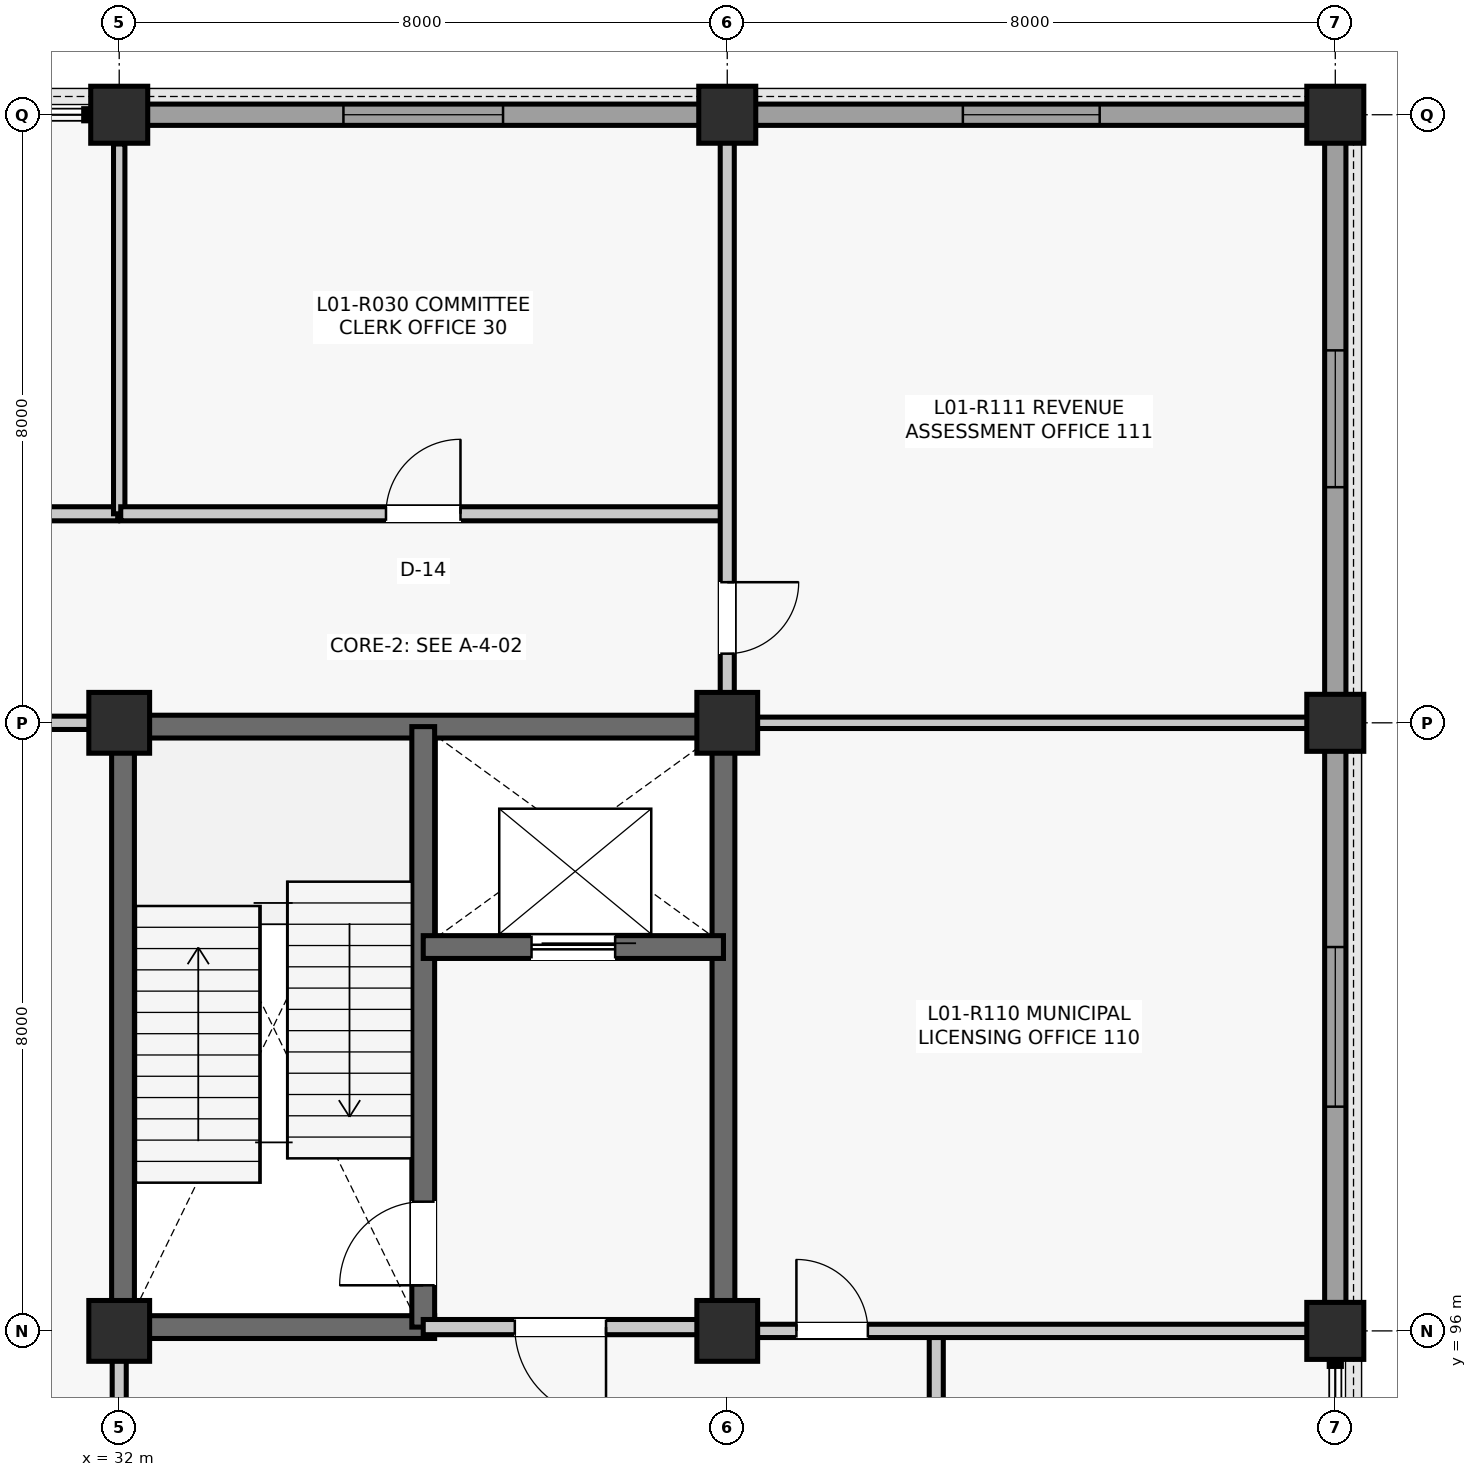
"""IFC4 building model, lengths in metres.
Left out: names, types, materials, properties, quantities, classifications, styles, units other than length and angle.
Written with IfcOpenShell. Run it as: python <this file> out.ifc"""

import sys

from ifc_helpers import new_model, si_unit, direction, frame, frame_2d, origin, origin_2d, place, context, subcontext, project, spatial, rectangle, extrude, element, fill, save


model = new_model("IFC4")
c1 = context("Model", 3, precision=1e-05, world=origin(), true_north=direction((0.0, 1.0)))
c2 = subcontext(c1, "Body", "Model", "MODEL_VIEW")
j1 = project(units=[si_unit("LENGTHUNIT", "METRE"), si_unit("PLANEANGLEUNIT", "RADIAN")], contexts=[c1])
p1 = place(None, origin())
s1 = spatial("IfcSite", under=j1, at=p1, CompositionType="ELEMENT")
p2 = place(p1, origin())
s2 = spatial("IfcBuilding", under=s1, at=p2, CompositionType="ELEMENT")
p3 = place(p2, frame((0.0, 0.0, 5.28)))
s3 = spatial("IfcBuildingStorey", under=s2, at=p3, CompositionType="ELEMENT", Elevation=5.28)
for number, where, z_axis, x_axis in (
    (1, (32.0, 96.0, 0.0), (0.0, 0.0, 1.0), (1.0, 0.0, 0.0)),
    (2, (32.0, 104.0, 0.0), (0.0, 0.0, 1.0), (1.0, 0.0, 0.0)),
):
    element("IfcColumn", number, at=place(p3, frame(where, z_axis=z_axis, x_axis=x_axis)), inside=s3, PredefinedType="COLUMN", context=c2, shape_type="SweptSolid", body=[
        extrude(rectangle(XDim=0.8, YDim=0.8, at=origin_2d()), origin(), (0.0, 0.0, 1.0), 4.62),
    ])
p4 = place(p3, frame((32.0, 112.0, 0.0), z_axis=(0.0, 0.0, 1.0), x_axis=(1.0, 0.0, 0.0)))
e3 = element("IfcColumn", 3, at=p4, inside=s3, PredefinedType="COLUMN", context=c2, shape_type="SweptSolid", body=[
    extrude(rectangle(XDim=0.75, YDim=0.75, at=origin_2d()), origin(), (0.0, 0.0, 1.0), 4.62),
])
for number, where, z_axis, x_axis in (
    (4, (40.0, 96.0, 0.0), (0.0, 0.0, 1.0), (1.0, 0.0, 0.0)),
    (5, (40.0, 104.0, 0.0), (0.0, 0.0, 1.0), (1.0, 0.0, 0.0)),
):
    element("IfcColumn", number, at=place(p3, frame(where, z_axis=z_axis, x_axis=x_axis)), inside=s3, PredefinedType="COLUMN", context=c2, shape_type="SweptSolid", body=[
        extrude(rectangle(XDim=0.8, YDim=0.8, at=origin_2d()), origin(), (0.0, 0.0, 1.0), 4.62),
    ])
for number, where, z_axis, x_axis in (
    (6, (40.0, 112.0, 0.0), (0.0, 0.0, 1.0), (1.0, 0.0, 0.0)),
    (7, (48.0, 96.0, 0.0), (0.0, 0.0, 1.0), (1.0, 0.0, 0.0)),
    (8, (48.0, 104.0, 0.0), (0.0, 0.0, 1.0), (1.0, 0.0, 0.0)),
    (9, (48.0, 112.0, 0.0), (0.0, 0.0, 1.0), (1.0, 0.0, 0.0)),
):
    element("IfcColumn", number, at=place(p3, frame(where, z_axis=z_axis, x_axis=x_axis)), inside=s3, PredefinedType="COLUMN", context=c2, shape_type="SweptSolid", body=[
        extrude(rectangle(XDim=0.75, YDim=0.75, at=origin_2d()), origin(), (0.0, 0.0, 1.0), 4.62),
    ])
p5 = place(p3, frame((32.36, 112.0, 0.0), z_axis=(0.0, 0.0, 1.0), x_axis=(1.0, 0.0, 0.0)))
e10 = element("IfcWall", 10, at=p5, inside=s3, PredefinedType="SOLIDWALL", context=c2, shape_type="SweptSolid", body=[
    extrude(rectangle(XDim=7.28, YDim=0.28, at=frame_2d((3.64, 0.0))), origin(), (0.0, 0.0, 1.0), 4.022),
])
p6 = place(p5, frame((2.59, 0.0, 0.9)))
e11 = element("IfcOpeningElement", 11, at=p6, cuts=e10, PredefinedType="OPENING", context=c2, shape_type="SweptSolid", body=[
    extrude(rectangle(XDim=2.1, YDim=2.4, at=frame_2d((1.05, 1.2))), frame((0.0, 0.15, 0.0), z_axis=(0.0, -1.0, 0.0), x_axis=(1.0, 0.0, 0.0)), (0.0, 0.0, 1.0), 0.3),
])
p7 = place(p3, frame((48.0, 96.36, 0.0), z_axis=(0.0, 0.0, 1.0), x_axis=(0.0, 1.0, 0.0)))
e12 = element("IfcWall", 12, at=p7, inside=s3, PredefinedType="SOLIDWALL", context=c2, shape_type="SweptSolid", body=[
    extrude(rectangle(XDim=7.28, YDim=0.28, at=frame_2d((3.64, 0.0))), origin(), (0.0, 0.0, 1.0), 3.977),
])
p8 = place(p7, frame((2.59, 0.0, 0.9)))
e13 = element("IfcOpeningElement", 13, at=p8, cuts=e12, PredefinedType="OPENING", context=c2, shape_type="SweptSolid", body=[
    extrude(rectangle(XDim=2.1, YDim=2.4, at=frame_2d((1.05, 1.2))), frame((0.0, 0.15, 0.0), z_axis=(0.0, -1.0, 0.0), x_axis=(1.0, 0.0, 0.0)), (0.0, 0.0, 1.0), 0.3),
])
p9 = place(p3, frame((40.36, 112.0, 0.0), z_axis=(0.0, 0.0, 1.0), x_axis=(1.0, 0.0, 0.0)))
e14 = element("IfcWall", 14, at=p9, inside=s3, PredefinedType="SOLIDWALL", context=c2, shape_type="SweptSolid", body=[
    extrude(rectangle(XDim=7.28, YDim=0.28, at=frame_2d((3.64, 0.0))), origin(), (0.0, 0.0, 1.0), 3.91),
])
p10 = place(p9, frame((2.74, 0.0, 0.9)))
e15 = element("IfcOpeningElement", 15, at=p10, cuts=e14, PredefinedType="OPENING", context=c2, shape_type="SweptSolid", body=[
    extrude(rectangle(XDim=1.8, YDim=2.3, at=frame_2d((0.9, 1.15))), frame((0.0, 0.15, 0.0), z_axis=(0.0, -1.0, 0.0), x_axis=(1.0, 0.0, 0.0)), (0.0, 0.0, 1.0), 0.3),
])
p11 = place(p3, frame((48.0, 104.36, 0.0), z_axis=(0.0, 0.0, 1.0), x_axis=(0.0, 1.0, 0.0)))
e16 = element("IfcWall", 16, at=p11, inside=s3, PredefinedType="SOLIDWALL", context=c2, shape_type="SweptSolid", body=[
    extrude(rectangle(XDim=7.28, YDim=0.28, at=frame_2d((3.64, 0.0))), origin(), (0.0, 0.0, 1.0), 3.91),
])
p12 = place(p11, frame((2.74, 0.0, 0.9)))
e17 = element("IfcOpeningElement", 17, at=p12, cuts=e16, PredefinedType="OPENING", context=c2, shape_type="SweptSolid", body=[
    extrude(rectangle(XDim=1.8, YDim=2.3, at=frame_2d((0.9, 1.15))), frame((0.0, 0.15, 0.0), z_axis=(0.0, -1.0, 0.0), x_axis=(1.0, 0.0, 0.0)), (0.0, 0.0, 1.0), 0.3),
])
for number, where, z_axis, x_axis in (
    (18, (32.05, 96.29, 0.0), (0.0, 0.0, 1.0), (0.0, 1.0, 0.0)),
    (19, (32.29, 103.95, 0.0), (0.0, 0.0, 1.0), (1.0, 0.0, 0.0)),
    (20, (39.95, 96.29, 0.0), (0.0, 0.0, 1.0), (0.0, 1.0, 0.0)),
):
    element("IfcWall", number, at=place(p3, frame(where, z_axis=z_axis, x_axis=x_axis)), inside=s3, PredefinedType="SHEAR", context=c2, shape_type="SweptSolid", body=[
        extrude(rectangle(XDim=7.42, YDim=0.3, at=frame_2d((3.71, 0.0))), origin(), (0.0, 0.0, 1.0), 4.335),
    ])
p13 = place(p3, frame((32.29, 96.05, 0.0), z_axis=(0.0, 0.0, 1.0), x_axis=(1.0, 0.0, 0.0)))
e21 = element("IfcWall", 21, at=p13, inside=s3, PredefinedType="SHEAR", context=c2, shape_type="SweptSolid", body=[
    extrude(rectangle(XDim=3.86, YDim=0.3, at=frame_2d((1.93, 0.0))), origin(), (0.0, 0.0, 1.0), 4.335),
])
p14 = place(p3, frame((36.0, 96.05, 0.0), z_axis=(0.0, 0.0, 1.0), x_axis=(0.0, 1.0, 0.0)))
e22 = element("IfcWall", 22, at=p14, inside=s3, PredefinedType="SHEAR", context=c2, shape_type="SweptSolid", body=[
    extrude(rectangle(XDim=7.9, YDim=0.3, at=frame_2d((3.95, 0.0))), origin(), (0.0, 0.0, 1.0), 4.335),
])
p15 = place(p14, frame((0.55, 0.0, 0.0)))
e23 = element("IfcOpeningElement", 23, at=p15, cuts=e22, PredefinedType="OPENING", context=c2, shape_type="SweptSolid", body=[
    extrude(rectangle(XDim=1.1, YDim=2.15, at=frame_2d((0.55, 1.075))), frame((0.0, 0.16, 0.0), z_axis=(0.0, -1.0, 0.0), x_axis=(1.0, 0.0, 0.0)), (0.0, 0.0, 1.0), 0.32),
])
p16 = place(p3, frame((36.0, 101.05, 0.0), z_axis=(0.0, 0.0, 1.0), x_axis=(1.0, 0.0, 0.0)))
e24 = element("IfcWall", 24, at=p16, inside=s3, PredefinedType="SHEAR", context=c2, shape_type="SweptSolid", body=[
    extrude(rectangle(XDim=3.95, YDim=0.3, at=frame_2d((1.975, 0.0))), origin(), (0.0, 0.0, 1.0), 4.335),
])
p17 = place(p16, frame((1.425, 0.0, 0.0)))
e25 = element("IfcOpeningElement", 25, at=p17, cuts=e24, PredefinedType="OPENING", context=c2, shape_type="SweptSolid", body=[
    extrude(rectangle(XDim=1.1, YDim=2.2, at=frame_2d((0.55, 1.1))), frame((0.0, 0.16, 0.0), z_axis=(0.0, -1.0, 0.0), x_axis=(1.0, 0.0, 0.0)), (0.0, 0.0, 1.0), 0.32),
])
p18 = place(p3, frame((36.0, 96.05, 0.0), z_axis=(0.0, 0.0, 1.0), x_axis=(1.0, 0.0, 0.0)))
e26 = element("IfcWall", 26, at=p18, inside=s3, PredefinedType="PARTITIONING", context=c2, shape_type="SweptSolid", body=[
    extrude(rectangle(XDim=3.61, YDim=0.2, at=frame_2d((1.805, 0.0))), origin(), (0.0, 0.0, 1.0), 3.712),
])
p19 = place(p18, frame((1.205, 0.0, 0.0)))
e27 = element("IfcOpeningElement", 27, at=p19, cuts=e26, PredefinedType="OPENING", context=c2, shape_type="SweptSolid", body=[
    extrude(rectangle(XDim=1.2, YDim=2.15, at=frame_2d((0.6, 1.075))), frame((0.0, 0.11, 0.0), z_axis=(0.0, -1.0, 0.0), x_axis=(1.0, 0.0, 0.0)), (0.0, 0.0, 1.0), 0.22),
])
p20 = place(p3, frame((24.02, 106.75, 0.0), z_axis=(0.0, 0.0, 1.0), x_axis=(1.0, 0.0, 0.0)))
e28 = element("IfcWall", 28, at=p20, inside=s3, PredefinedType="PARTITIONING", context=c2, shape_type="SweptSolid", body=[
    extrude(rectangle(XDim=7.96, YDim=0.185, at=frame_2d((3.98, 0.0))), origin(), (0.0, 0.0, 1.0), 3.787),
])
p21 = place(p20, frame((3.5, 0.0, 0.0)))
e29 = element("IfcOpeningElement", 29, at=p21, cuts=e28, PredefinedType="OPENING", context=c2, shape_type="SweptSolid", body=[
    extrude(rectangle(XDim=0.96, YDim=2.14, at=frame_2d((0.48, 1.07))), frame((0.0, 0.103, 0.0), z_axis=(0.0, -1.0, 0.0), x_axis=(1.0, 0.0, 0.0)), (0.0, 0.0, 1.0), 0.205),
])
p22 = place(p3, frame((32.0, 106.75, 0.0), z_axis=(0.0, 0.0, 1.0), x_axis=(0.0, 1.0, 0.0)))
e30 = element("IfcWall", 30, at=p22, inside=s3, PredefinedType="PARTITIONING", context=c2, shape_type="SweptSolid", body=[
    extrude(rectangle(XDim=4.865, YDim=0.15, at=frame_2d((2.433, 0.0))), origin(), (0.0, 0.0, 1.0), 3.902),
])
p23 = place(p3, frame((32.02, 106.75, 0.0), z_axis=(0.0, 0.0, 1.0), x_axis=(1.0, 0.0, 0.0)))
e31 = element("IfcWall", 31, at=p23, inside=s3, PredefinedType="PARTITIONING", context=c2, shape_type="SweptSolid", body=[
    extrude(rectangle(XDim=7.96, YDim=0.185, at=frame_2d((3.98, 0.0))), origin(), (0.0, 0.0, 1.0), 3.781),
])
p24 = place(p23, frame((3.49, 0.0, 0.0)))
e32 = element("IfcOpeningElement", 32, at=p24, cuts=e31, PredefinedType="OPENING", context=c2, shape_type="SweptSolid", body=[
    extrude(rectangle(XDim=0.98, YDim=2.15, at=frame_2d((0.49, 1.075))), frame((0.0, 0.103, 0.0), z_axis=(0.0, -1.0, 0.0), x_axis=(1.0, 0.0, 0.0)), (0.0, 0.0, 1.0), 0.205),
])
p25 = place(p3, frame((42.75, 90.7, 0.0), z_axis=(0.0, 0.0, 1.0), x_axis=(0.0, 1.0, 0.0)))
e33 = element("IfcWall", 33, at=p25, inside=s3, PredefinedType="PARTITIONING", context=c2, shape_type="SweptSolid", body=[
    extrude(rectangle(XDim=5.28, YDim=0.185, at=frame_2d((2.64, 0.0))), origin(), (0.0, 0.0, 1.0), 3.787),
])
p26 = place(p3, frame((32.0, 88.365, 0.0), z_axis=(0.0, 0.0, 1.0), x_axis=(0.0, 1.0, 0.0)))
e34 = element("IfcWall", 34, at=p26, inside=s3, PredefinedType="PARTITIONING", context=c2, shape_type="SweptSolid", body=[
    extrude(rectangle(XDim=7.245, YDim=0.185, at=frame_2d((3.623, 0.0))), origin(), (0.0, 0.0, 1.0), 3.851),
])
p27 = place(p26, frame((2.623, 0.0, 0.0)))
e35 = element("IfcOpeningElement", 35, at=p27, cuts=e34, PredefinedType="OPENING", context=c2, shape_type="SweptSolid", body=[
    extrude(rectangle(XDim=2.0, YDim=2.4, at=frame_2d((1.0, 1.2))), frame((0.0, 0.103, 0.0), z_axis=(0.0, -1.0, 0.0), x_axis=(1.0, 0.0, 0.0)), (0.0, 0.0, 1.0), 0.205),
])
p28 = place(p3, frame((24.365, 104.0, 0.0), z_axis=(0.0, 0.0, 1.0), x_axis=(1.0, 0.0, 0.0)))
e36 = element("IfcWall", 36, at=p28, inside=s3, PredefinedType="PARTITIONING", context=c2, shape_type="SweptSolid", body=[
    extrude(rectangle(XDim=7.245, YDim=0.175, at=frame_2d((3.623, 0.0))), origin(), (0.0, 0.0, 1.0), 3.712),
])
p29 = place(p28, frame((2.722, 0.0, 0.0)))
e37 = element("IfcOpeningElement", 37, at=p29, cuts=e36, PredefinedType="OPENING", context=c2, shape_type="SweptSolid", body=[
    extrude(rectangle(XDim=1.8, YDim=2.35, at=frame_2d((0.9, 1.175))), frame((0.0, 0.097, 0.0), z_axis=(0.0, -1.0, 0.0), x_axis=(1.0, 0.0, 0.0)), (0.0, 0.0, 1.0), 0.195),
])
p30 = place(p3, frame((40.0, 104.39, 0.0), z_axis=(0.0, 0.0, 1.0), x_axis=(0.0, 1.0, 0.0)))
e38 = element("IfcWall", 38, at=p30, inside=s3, PredefinedType="PARTITIONING", context=c2, shape_type="SweptSolid", body=[
    extrude(rectangle(XDim=7.245, YDim=0.185, at=frame_2d((3.623, 0.0))), origin(), (0.0, 0.0, 1.0), 3.781),
])
p31 = place(p30, frame((0.52, 0.0, 0.0)))
e39 = element("IfcOpeningElement", 39, at=p31, cuts=e38, PredefinedType="OPENING", context=c2, shape_type="SweptSolid", body=[
    extrude(rectangle(XDim=0.94, YDim=2.12, at=frame_2d((0.47, 1.06))), frame((0.0, 0.103, 0.0), z_axis=(0.0, -1.0, 0.0), x_axis=(1.0, 0.0, 0.0)), (0.0, 0.0, 1.0), 0.205),
])
p32 = place(p3, frame((40.39, 96.0, 0.0), z_axis=(0.0, 0.0, 1.0), x_axis=(1.0, 0.0, 0.0)))
e40 = element("IfcWall", 40, at=p32, inside=s3, PredefinedType="PARTITIONING", context=c2, shape_type="SweptSolid", body=[
    extrude(rectangle(XDim=7.245, YDim=0.175, at=frame_2d((3.623, 0.0))), origin(), (0.0, 0.0, 1.0), 3.787),
])
p33 = place(p32, frame((0.52, 0.0, 0.0)))
e41 = element("IfcOpeningElement", 41, at=p33, cuts=e40, PredefinedType="OPENING", context=c2, shape_type="SweptSolid", body=[
    extrude(rectangle(XDim=0.94, YDim=2.12, at=frame_2d((0.47, 1.06))), frame((0.0, 0.097, 0.0), z_axis=(0.0, -1.0, 0.0), x_axis=(1.0, 0.0, 0.0)), (0.0, 0.0, 1.0), 0.195),
])
p34 = place(p3, frame((40.39, 104.0, 0.0), z_axis=(0.0, 0.0, 1.0), x_axis=(1.0, 0.0, 0.0)))
e42 = element("IfcWall", 42, at=p34, inside=s3, PredefinedType="PARTITIONING", context=c2, shape_type="SweptSolid", body=[
    extrude(rectangle(XDim=7.245, YDim=0.15, at=frame_2d((3.623, 0.0))), origin(), (0.0, 0.0, 1.0), 3.771),
])
p35 = place(p6, origin())
e43 = element("IfcWindow", 43, at=p35, inside=s3, PartitioningType="SINGLE_PANEL", PredefinedType="WINDOW", context=c2, shape_type="SweptSolid", body=[
    extrude(rectangle(XDim=2.1, YDim=2.4, at=frame_2d((1.05, 1.2))), frame((0.0, 0.03, 0.0), z_axis=(0.0, -1.0, 0.0), x_axis=(1.0, 0.0, 0.0)), (0.0, 0.0, 1.0), 0.06),
])
fill(e11, e43)
p36 = place(p8, origin())
e44 = element("IfcWindow", 44, at=p36, inside=s3, PartitioningType="SINGLE_PANEL", PredefinedType="WINDOW", context=c2, shape_type="SweptSolid", body=[
    extrude(rectangle(XDim=2.1, YDim=2.4, at=frame_2d((1.05, 1.2))), frame((0.0, 0.03, 0.0), z_axis=(0.0, -1.0, 0.0), x_axis=(1.0, 0.0, 0.0)), (0.0, 0.0, 1.0), 0.06),
])
fill(e13, e44)
p37 = place(p10, origin())
e45 = element("IfcWindow", 45, at=p37, inside=s3, PartitioningType="SINGLE_PANEL", PredefinedType="WINDOW", context=c2, shape_type="SweptSolid", body=[
    extrude(rectangle(XDim=1.8, YDim=2.3, at=frame_2d((0.9, 1.15))), frame((0.0, 0.03, 0.0), z_axis=(0.0, -1.0, 0.0), x_axis=(1.0, 0.0, 0.0)), (0.0, 0.0, 1.0), 0.06),
])
fill(e15, e45)
p38 = place(p12, origin())
e46 = element("IfcWindow", 46, at=p38, inside=s3, PartitioningType="SINGLE_PANEL", PredefinedType="WINDOW", context=c2, shape_type="SweptSolid", body=[
    extrude(rectangle(XDim=1.8, YDim=2.3, at=frame_2d((0.9, 1.15))), frame((0.0, 0.03, 0.0), z_axis=(0.0, -1.0, 0.0), x_axis=(1.0, 0.0, 0.0)), (0.0, 0.0, 1.0), 0.06),
])
fill(e17, e46)
p39 = place(p15, origin())
e47 = element("IfcDoor", 47, at=p39, inside=s3, OperationType="SINGLE_SWING_LEFT", PredefinedType="DOOR", context=c2, shape_type="SweptSolid", body=[
    extrude(rectangle(XDim=1.1, YDim=2.15, at=frame_2d((0.55, 1.075))), frame((0.0, 0.025, 0.0), z_axis=(0.0, -1.0, 0.0), x_axis=(1.0, 0.0, 0.0)), (0.0, 0.0, 1.0), 0.05),
])
fill(e23, e47)
p40 = place(p17, origin())
e48 = element("IfcDoor", 48, at=p40, inside=s3, OperationType="SLIDING_TO_LEFT", PredefinedType="DOOR", context=c2, shape_type="SweptSolid", body=[
    extrude(rectangle(XDim=1.1, YDim=2.2, at=frame_2d((0.55, 1.1))), frame((0.0, 0.025, 0.0), z_axis=(0.0, -1.0, 0.0), x_axis=(1.0, 0.0, 0.0)), (0.0, 0.0, 1.0), 0.05),
])
fill(e25, e48)
p41 = place(p19, frame((1.2, 0.0, 0.0), z_axis=(0.0, 0.0, 1.0), x_axis=(-1.0, 0.0, 0.0)))
e49 = element("IfcDoor", 49, at=p41, inside=s3, OperationType="SINGLE_SWING_RIGHT", PredefinedType="DOOR", context=c2, shape_type="SweptSolid", body=[
    extrude(rectangle(XDim=1.2, YDim=2.15, at=frame_2d((0.6, 1.075))), frame((0.0, 0.025, 0.0), z_axis=(0.0, -1.0, 0.0), x_axis=(1.0, 0.0, 0.0)), (0.0, 0.0, 1.0), 0.05),
])
fill(e27, e49)
p42 = place(p24, origin())
e50 = element("IfcDoor", 50, at=p42, inside=s3, OperationType="SINGLE_SWING_RIGHT", PredefinedType="DOOR", context=c2, shape_type="SweptSolid", body=[
    extrude(rectangle(XDim=0.98, YDim=2.15, at=frame_2d((0.49, 1.075))), frame((0.0, 0.025, 0.0), z_axis=(0.0, -1.0, 0.0), x_axis=(1.0, 0.0, 0.0)), (0.0, 0.0, 1.0), 0.05),
])
fill(e32, e50)
p43 = place(p31, frame((0.94, 0.0, 0.0), z_axis=(0.0, 0.0, 1.0), x_axis=(-1.0, 0.0, 0.0)))
e51 = element("IfcDoor", 51, at=p43, inside=s3, OperationType="SINGLE_SWING_RIGHT", PredefinedType="DOOR", context=c2, shape_type="SweptSolid", body=[
    extrude(rectangle(XDim=0.94, YDim=2.12, at=frame_2d((0.47, 1.06))), frame((0.0, 0.025, 0.0), z_axis=(0.0, -1.0, 0.0), x_axis=(1.0, 0.0, 0.0)), (0.0, 0.0, 1.0), 0.05),
])
fill(e39, e51)
p44 = place(p33, origin())
e52 = element("IfcDoor", 52, at=p44, inside=s3, OperationType="SINGLE_SWING_LEFT", PredefinedType="DOOR", context=c2, shape_type="SweptSolid", body=[
    extrude(rectangle(XDim=0.94, YDim=2.12, at=frame_2d((0.47, 1.06))), frame((0.0, 0.025, 0.0), z_axis=(0.0, -1.0, 0.0), x_axis=(1.0, 0.0, 0.0)), (0.0, 0.0, 1.0), 0.05),
])
fill(e41, e52)
save(model, sys.argv[1])
